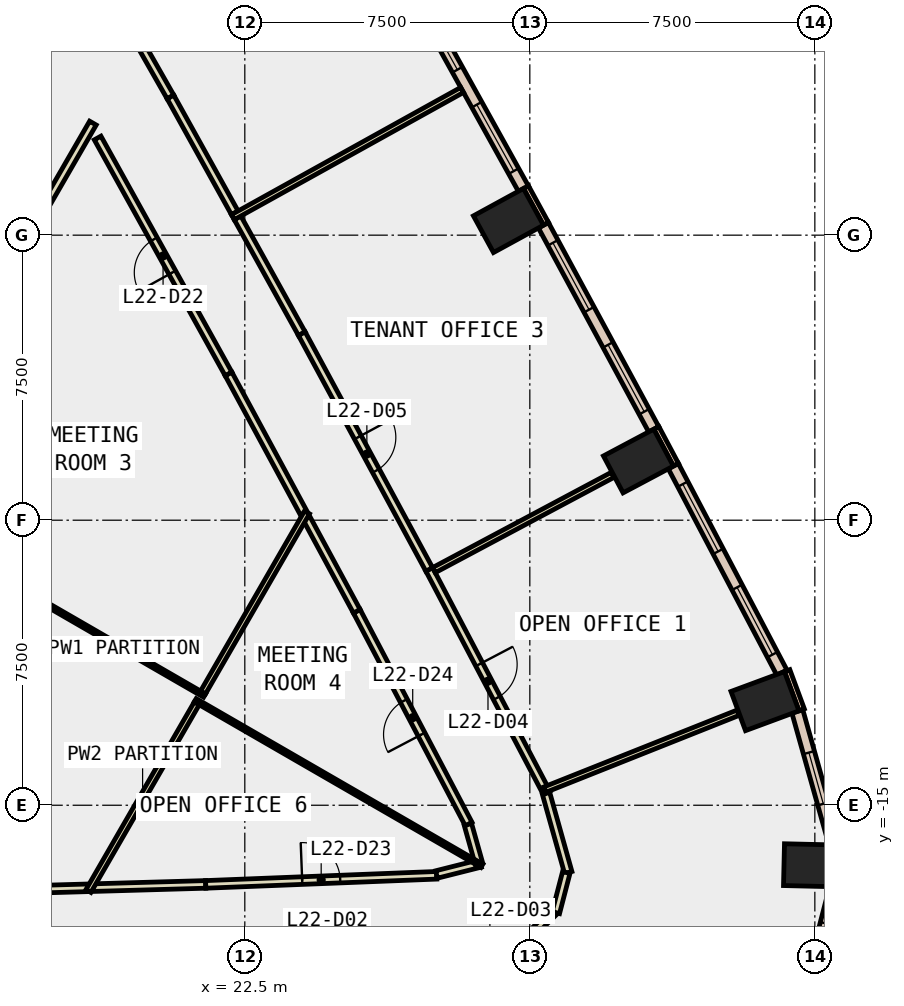
"""IFC4 building model, lengths in metres.
Left out: names, types, materials, properties, quantities, classifications, styles, units other than length and angle.
Written with IfcOpenShell. Run it as: python <this file> out.ifc"""

import sys

from ifc_helpers import new_model, si_unit, direction, frame, frame_2d, origin, origin_2d, place, context, subcontext, project, spatial, rectangle, extrude, element, fill, save


model = new_model("IFC4")
c1 = context("Model", 3, precision=1e-05, world=origin(), true_north=direction((0.0, 1.0)))
c2 = subcontext(c1, "Body", "Model", "MODEL_VIEW")
j1 = project(units=[si_unit("LENGTHUNIT", "METRE"), si_unit("PLANEANGLEUNIT", "RADIAN")], contexts=[c1])
p1 = place(None, origin())
s1 = spatial("IfcSite", under=j1, at=p1, CompositionType="ELEMENT")
p2 = place(p1, origin())
s2 = spatial("IfcBuilding", under=s1, at=p2, CompositionType="ELEMENT")
p3 = place(p2, frame((0.0, 0.0, 103.4)))
s3 = spatial("IfcBuildingStorey", under=s2, at=p3, CompositionType="ELEMENT", Elevation=103.4)
for number, where, z_axis, x_axis in (
    (1, (37.438, -16.581, -0.4), (0.0, 0.0, 1.0), (0.023, 1.0, 0.0)),
    (2, (36.188, -12.261, -0.4), (0.0, 0.0, 1.0), (-0.347, 0.938, 0.0)),
    (3, (32.858, -5.943, -0.4), (0.0, 0.0, 1.0), (-0.469, 0.883, 0.0)),
    (4, (29.438, 0.385, -0.4), (0.0, 0.0, 1.0), (-0.48, 0.877, 0.0)),
):
    element("IfcColumn", number, at=place(p3, frame(where, z_axis=z_axis, x_axis=x_axis)), inside=s3, PredefinedType="COLUMN", context=c2, shape_type="SweptSolid", body=[
        extrude(rectangle(XDim=1.1, YDim=1.5, at=origin_2d()), origin(), (0.0, 0.0, 1.0), 4.2),
    ])
p4 = place(p3, frame((37.153, -12.49, 0.0), z_axis=(0.0, 0.0, 1.0), x_axis=(-0.347205967468, 0.937788897436, 0.0)))
e5 = element("IfcWall", 5, at=p4, inside=s3, PredefinedType="STANDARD", context=c2, shape_type="SweptSolid", body=[
    extrude(rectangle(XDim=1.1, YDim=0.15, at=frame_2d((0.55, 0.0))), origin(), (0.0, 0.0, 1.0), 3.8),
])
p5 = place(p3, frame((33.845, -6.042, 0.0), z_axis=(0.0, 0.0, 1.0), x_axis=(-0.46919310775, 0.883095593716, 0.0)))
e6 = element("IfcWall", 6, at=p5, inside=s3, PredefinedType="STANDARD", context=c2, shape_type="SweptSolid", body=[
    extrude(rectangle(XDim=1.099, YDim=0.15, at=frame_2d((0.55, 0.0))), origin(), (0.0, 0.0, 1.0), 3.8),
])
p6 = place(p3, frame((30.426, 0.298, 0.0), z_axis=(0.0, 0.0, 1.0), x_axis=(-0.479737645119, 0.877411985247, 0.0)))
e7 = element("IfcWall", 7, at=p6, inside=s3, PredefinedType="STANDARD", context=c2, shape_type="SweptSolid", body=[
    extrude(rectangle(XDim=1.101, YDim=0.15, at=frame_2d((0.55, 0.0))), origin(), (0.0, 0.0, 1.0), 3.8),
])
p7 = place(p3, frame((37.189, -20.433, 0.0), z_axis=(0.0, 0.0, 1.0), x_axis=(0.251046938153, 0.967974914367, 0.0)))
e8 = element("IfcWall", 8, at=p7, inside=s3, PredefinedType="STANDARD", context=c2, shape_type="SweptSolid", body=[
    extrude(rectangle(XDim=3.398, YDim=0.3, at=frame_2d((1.699, 0.0))), origin(), (0.0, 0.0, 1.0), 3.8),
])
p8 = place(p7, frame((0.999, 0.0, 0.9)))
e9 = element("IfcOpeningElement", 9, at=p8, cuts=e8, PredefinedType="OPENING", context=c2, shape_type="SweptSolid", body=[
    extrude(rectangle(XDim=1.4, YDim=2.6, at=frame_2d((0.7, 1.3))), frame((0.0, 0.16, 0.0), z_axis=(0.0, -1.0, 0.0), x_axis=(1.0, 0.0, 0.0)), (0.0, 0.0, 1.0), 0.32),
])
p9 = place(p3, frame((38.026, -16.046, 0.0), z_axis=(0.0, 0.0, 1.0), x_axis=(-0.270054089595, 0.96284515302, 0.0)))
e10 = element("IfcWall", 10, at=p9, inside=s3, PredefinedType="STANDARD", context=c2, shape_type="SweptSolid", body=[
    extrude(rectangle(XDim=3.651, YDim=0.3, at=frame_2d((1.825, 0.0))), origin(), (0.0, 0.0, 1.0), 3.8),
])
p10 = place(p9, frame((1.125, 0.0, 0.9)))
e11 = element("IfcOpeningElement", 11, at=p10, cuts=e10, PredefinedType="OPENING", context=c2, shape_type="SweptSolid", body=[
    extrude(rectangle(XDim=1.4, YDim=2.6, at=frame_2d((0.7, 1.3))), frame((0.0, 0.16, 0.0), z_axis=(0.0, -1.0, 0.0), x_axis=(1.0, 0.0, 0.0)), (0.0, 0.0, 1.0), 0.32),
])
p11 = place(p3, frame((36.633, -11.511, 0.0), z_axis=(0.0, 0.0, 1.0), x_axis=(-0.465380908665, 0.88511050714, 0.0)))
e12 = element("IfcWall", 12, at=p11, inside=s3, PredefinedType="STANDARD", context=c2, shape_type="SweptSolid", body=[
    extrude(rectangle(XDim=6.139, YDim=0.3, at=frame_2d((3.07, 0.0))), origin(), (0.0, 0.0, 1.0), 3.8),
])
p12 = place(p11, frame((0.535, 0.0, 0.9)))
e13 = element("IfcOpeningElement", 13, at=p12, cuts=e12, PredefinedType="OPENING", context=c2, shape_type="SweptSolid", body=[
    extrude(rectangle(XDim=2.0, YDim=2.6, at=frame_2d((1.0, 1.3))), frame((0.0, 0.16, 0.0), z_axis=(0.0, -1.0, 0.0), x_axis=(1.0, 0.0, 0.0)), (0.0, 0.0, 1.0), 0.32),
])
p13 = place(p11, frame((3.604, 0.0, 0.9)))
e14 = element("IfcOpeningElement", 14, at=p13, cuts=e12, PredefinedType="OPENING", context=c2, shape_type="SweptSolid", body=[
    extrude(rectangle(XDim=2.0, YDim=2.6, at=frame_2d((1.0, 1.3))), frame((0.0, 0.16, 0.0), z_axis=(0.0, -1.0, 0.0), x_axis=(1.0, 0.0, 0.0)), (0.0, 0.0, 1.0), 0.32),
])
p14 = place(p3, frame((33.26, -5.108, 0.0), z_axis=(0.0, 0.0, 1.0), x_axis=(-0.475573079782, 0.879676216449, 0.0)))
e15 = element("IfcWall", 15, at=p14, inside=s3, PredefinedType="STANDARD", context=c2, shape_type="SweptSolid", body=[
    extrude(rectangle(XDim=6.104, YDim=0.3, at=frame_2d((3.052, 0.0))), origin(), (0.0, 0.0, 1.0), 3.8),
])
p15 = place(p14, frame((0.526, 0.0, 0.9)))
e16 = element("IfcOpeningElement", 16, at=p15, cuts=e15, PredefinedType="OPENING", context=c2, shape_type="SweptSolid", body=[
    extrude(rectangle(XDim=2.0, YDim=2.6, at=frame_2d((1.0, 1.3))), frame((0.0, 0.16, 0.0), z_axis=(0.0, -1.0, 0.0), x_axis=(1.0, 0.0, 0.0)), (0.0, 0.0, 1.0), 0.32),
])
p16 = place(p14, frame((3.578, 0.0, 0.9)))
e17 = element("IfcOpeningElement", 17, at=p16, cuts=e15, PredefinedType="OPENING", context=c2, shape_type="SweptSolid", body=[
    extrude(rectangle(XDim=2.0, YDim=2.6, at=frame_2d((1.0, 1.3))), frame((0.0, 0.16, 0.0), z_axis=(0.0, -1.0, 0.0), x_axis=(1.0, 0.0, 0.0)), (0.0, 0.0, 1.0), 0.32),
])
p17 = place(p3, frame((29.83, 1.225, 0.0), z_axis=(0.0, 0.0, 1.0), x_axis=(-0.485170774404, 0.874419418623, 0.0)))
e18 = element("IfcWall", 18, at=p17, inside=s3, PredefinedType="STANDARD", context=c2, shape_type="SweptSolid", body=[
    extrude(rectangle(XDim=6.103, YDim=0.3, at=frame_2d((3.052, 0.0))), origin(), (0.0, 0.0, 1.0), 3.8),
])
p18 = place(p17, frame((0.526, 0.0, 0.9)))
e19 = element("IfcOpeningElement", 19, at=p18, cuts=e18, PredefinedType="OPENING", context=c2, shape_type="SweptSolid", body=[
    extrude(rectangle(XDim=2.0, YDim=2.6, at=frame_2d((1.0, 1.3))), frame((0.0, 0.16, 0.0), z_axis=(0.0, -1.0, 0.0), x_axis=(1.0, 0.0, 0.0)), (0.0, 0.0, 1.0), 0.32),
])
p19 = place(p17, frame((3.578, 0.0, 0.9)))
e20 = element("IfcOpeningElement", 20, at=p19, cuts=e18, PredefinedType="OPENING", context=c2, shape_type="SweptSolid", body=[
    extrude(rectangle(XDim=2.0, YDim=2.6, at=frame_2d((1.0, 1.3))), frame((0.0, 0.16, 0.0), z_axis=(0.0, -1.0, 0.0), x_axis=(1.0, 0.0, 0.0)), (0.0, 0.0, 1.0), 0.32),
])
p20 = place(p3, frame((14.519, -17.283, 0.0), z_axis=(0.0, 0.0, 1.0), x_axis=(0.999591204998, 0.028590608419, 0.0)))
e21 = element("IfcWall", 21, at=p20, inside=s3, PredefinedType="PARTITIONING", context=c2, shape_type="SweptSolid", body=[
    extrude(rectangle(XDim=3.843, YDim=0.2, at=frame_2d((1.921, 0.0))), origin(), (0.0, 0.0, 1.0), 3.8),
])
p21 = place(p3, frame((24.051, -7.315, 0.0), z_axis=(0.0, 0.0, 1.0), x_axis=(-0.475308630647, 0.87981913234, 0.0)))
e22 = element("IfcWall", 22, at=p21, inside=s3, PredefinedType="PARTITIONING", context=c2, shape_type="SweptSolid", body=[
    extrude(rectangle(XDim=4.166, YDim=0.2, at=frame_2d((2.083, 0.0))), origin(), (0.0, 0.0, 1.0), 3.8),
])
p22 = place(p3, frame((22.071, -3.65, 0.0), z_axis=(0.0, 0.0, 1.0), x_axis=(-0.485198988697, 0.874403763354, 0.0)))
e23 = element("IfcWall", 23, at=p22, inside=s3, PredefinedType="PARTITIONING", context=c2, shape_type="SweptSolid", body=[
    extrude(rectangle(XDim=7.098, YDim=0.2, at=frame_2d((3.549, 0.0))), origin(), (0.0, 0.0, 1.0), 3.8),
])
p23 = place(p22, frame((3.049, 0.0, 0.0)))
e24 = element("IfcOpeningElement", 24, at=p23, cuts=e23, PredefinedType="OPENING", context=c2, shape_type="SweptSolid", body=[
    extrude(rectangle(XDim=1.0, YDim=2.1, at=frame_2d((0.5, 1.05))), frame((0.0, 0.11, 0.0), z_axis=(0.0, -1.0, 0.0), x_axis=(1.0, 0.0, 0.0)), (0.0, 0.0, 1.0), 0.22),
])
p24 = place(p3, frame((18.509, -17.168, 0.0), z_axis=(0.0, 0.0, 1.0), x_axis=(0.999588854267, 0.028672677323, 0.0)))
e25 = element("IfcWall", 25, at=p24, inside=s3, PredefinedType="PARTITIONING", context=c2, shape_type="SweptSolid", body=[
    extrude(rectangle(XDim=2.963, YDim=0.2, at=frame_2d((1.481, 0.0))), origin(), (0.0, 0.0, 1.0), 3.8),
])
p25 = place(p3, frame((21.471, -17.083, 0.0), z_axis=(0.0, 0.0, 1.0), x_axis=(0.999221407079, 0.039453512338, 0.0)))
e26 = element("IfcWall", 26, at=p25, inside=s3, PredefinedType="PARTITIONING", context=c2, shape_type="SweptSolid", body=[
    extrude(rectangle(XDim=6.083, YDim=0.2, at=frame_2d((3.042, 0.0))), origin(), (0.0, 0.0, 1.0), 3.8),
])
p26 = place(p25, frame((2.541, 0.0, 0.0)))
e27 = element("IfcOpeningElement", 27, at=p26, cuts=e26, PredefinedType="OPENING", context=c2, shape_type="SweptSolid", body=[
    extrude(rectangle(XDim=1.0, YDim=2.1, at=frame_2d((0.5, 1.05))), frame((0.0, 0.11, 0.0), z_axis=(0.0, -1.0, 0.0), x_axis=(1.0, 0.0, 0.0)), (0.0, 0.0, 1.0), 0.22),
])
p27 = place(p3, frame((27.546, -16.822, 0.0), z_axis=(0.0, 0.0, 1.0), x_axis=(0.969694756333, 0.244319625777, 0.0)))
e28 = element("IfcWall", 28, at=p27, inside=s3, PredefinedType="PARTITIONING", context=c2, shape_type="SweptSolid", body=[
    extrude(rectangle(XDim=1.191, YDim=0.2, at=frame_2d((0.596, 0.0))), origin(), (0.0, 0.0, 1.0), 3.8),
])
p28 = place(p3, frame((28.662, -16.541, 0.0), z_axis=(0.0, 0.0, 1.0), x_axis=(-0.270771802087, 0.96264356394, 0.0)))
e29 = element("IfcWall", 29, at=p28, inside=s3, PredefinedType="PARTITIONING", context=c2, shape_type="SweptSolid", body=[
    extrude(rectangle(XDim=1.078, YDim=0.2, at=frame_2d((0.539, 0.0))), origin(), (0.0, 0.0, 1.0), 3.8),
])
p29 = place(p3, frame((28.39, -15.495, 0.0), z_axis=(0.0, 0.0, 1.0), x_axis=(-0.465367816287, 0.885117390838, 0.0)))
e30 = element("IfcWall", 30, at=p29, inside=s3, PredefinedType="PARTITIONING", context=c2, shape_type="SweptSolid", body=[
    extrude(rectangle(XDim=6.326, YDim=0.2, at=frame_2d((3.163, 0.0))), origin(), (0.0, 0.0, 1.0), 3.8),
])
p30 = place(p29, frame((2.663, 0.0, 0.0)))
e31 = element("IfcOpeningElement", 31, at=p30, cuts=e30, PredefinedType="OPENING", context=c2, shape_type="SweptSolid", body=[
    extrude(rectangle(XDim=1.0, YDim=2.1, at=frame_2d((0.5, 1.05))), frame((0.0, 0.11, 0.0), z_axis=(0.0, -1.0, 0.0), x_axis=(1.0, 0.0, 0.0)), (0.0, 0.0, 1.0), 0.22),
])
p31 = place(p3, frame((25.446, -9.896, 0.0), z_axis=(0.0, 0.0, 1.0), x_axis=(-0.475427182652, 0.879755076141, 0.0)))
e32 = element("IfcWall", 32, at=p31, inside=s3, PredefinedType="PARTITIONING", context=c2, shape_type="SweptSolid", body=[
    extrude(rectangle(XDim=2.785, YDim=0.2, at=frame_2d((1.393, 0.0))), origin(), (0.0, 0.0, 1.0), 3.8),
])
p32 = place(p3, frame((30.426, -14.685, 0.0), z_axis=(0.0, 0.0, 1.0), x_axis=(0.270131711391, -0.962823378664, 0.0)))
e33 = element("IfcWall", 33, at=p32, inside=s3, PredefinedType="PARTITIONING", context=c2, shape_type="SweptSolid", body=[
    extrude(rectangle(XDim=2.166, YDim=0.2, at=frame_2d((1.083, 0.0))), origin(), (0.0, 0.0, 1.0), 3.8),
])
p33 = place(p3, frame((30.959, -16.771, 0.0), z_axis=(0.0, 0.0, 1.0), x_axis=(-0.251109729392, -0.967958627114, 0.0)))
e34 = element("IfcWall", 34, at=p33, inside=s3, PredefinedType="PARTITIONING", context=c2, shape_type="SweptSolid", body=[
    extrude(rectangle(XDim=1.091, YDim=0.2, at=frame_2d((0.545, 0.0))), origin(), (0.0, 0.0, 1.0), 3.8),
])
p34 = place(p3, frame((30.639, -17.801, 0.0), z_axis=(0.0, 0.0, 1.0), x_axis=(-0.713329122722, -0.700829196507, 0.0)))
e35 = element("IfcWall", 35, at=p34, inside=s3, PredefinedType="PARTITIONING", context=c2, shape_type="SweptSolid", body=[
    extrude(rectangle(XDim=0.879, YDim=0.2, at=frame_2d((0.439, 0.0))), origin(), (0.0, 0.0, 1.0), 3.8),
])
p35 = place(p3, frame((27.353, -8.794, 0.0), z_axis=(0.0, 0.0, 1.0), x_axis=(0.465239168813, -0.885185017836, 0.0)))
e36 = element("IfcWall", 36, at=p35, inside=s3, PredefinedType="PARTITIONING", context=c2, shape_type="SweptSolid", body=[
    extrude(rectangle(XDim=6.646, YDim=0.2, at=frame_2d((3.323, 0.0))), origin(), (0.0, 0.0, 1.0), 3.8),
])
p36 = place(p35, frame((2.823, 0.0, 0.0)))
e37 = element("IfcOpeningElement", 37, at=p36, cuts=e36, PredefinedType="OPENING", context=c2, shape_type="SweptSolid", body=[
    extrude(rectangle(XDim=1.0, YDim=2.1, at=frame_2d((0.5, 1.05))), frame((0.0, 0.11, 0.0), z_axis=(0.0, -1.0, 0.0), x_axis=(1.0, 0.0, 0.0)), (0.0, 0.0, 1.0), 0.22),
])
p37 = place(p3, frame((22.309, 0.456, 0.0), z_axis=(0.0, 0.0, 1.0), x_axis=(0.484982854201, -0.87452365956, 0.0)))
e38 = element("IfcWall", 38, at=p37, inside=s3, PredefinedType="PARTITIONING", context=c2, shape_type="SweptSolid", body=[
    extrude(rectangle(XDim=3.487, YDim=0.2, at=frame_2d((1.743, 0.0))), origin(), (0.0, 0.0, 1.0), 3.8),
])
p38 = place(p3, frame((24.0, -2.593, 0.0), z_axis=(0.0, 0.0, 1.0), x_axis=(0.475480817472, -0.879726089312, 0.0)))
e39 = element("IfcWall", 39, at=p38, inside=s3, PredefinedType="PARTITIONING", context=c2, shape_type="SweptSolid", body=[
    extrude(rectangle(XDim=7.05, YDim=0.2, at=frame_2d((3.525, 0.0))), origin(), (0.0, 0.0, 1.0), 3.8),
])
p39 = place(p38, frame((3.1, 0.0, 0.0)))
e40 = element("IfcOpeningElement", 40, at=p39, cuts=e39, PredefinedType="OPENING", context=c2, shape_type="SweptSolid", body=[
    extrude(rectangle(XDim=1.0, YDim=2.1, at=frame_2d((0.5, 1.05))), frame((0.0, 0.11, 0.0), z_axis=(0.0, -1.0, 0.0), x_axis=(1.0, 0.0, 0.0)), (0.0, 0.0, 1.0), 0.22),
])
p40 = place(p3, frame((16.98, 9.89, 0.0), z_axis=(0.0, 0.0, 1.0), x_axis=(0.495123170501, -0.868822793228, 0.0)))
e41 = element("IfcWall", 41, at=p40, inside=s3, PredefinedType="PARTITIONING", context=c2, shape_type="SweptSolid", body=[
    extrude(rectangle(XDim=7.198, YDim=0.2, at=frame_2d((3.599, 0.0))), origin(), (0.0, 0.0, 1.0), 3.8),
])
p41 = place(p40, frame((3.099, 0.0, 0.0)))
e42 = element("IfcOpeningElement", 42, at=p41, cuts=e41, PredefinedType="OPENING", context=c2, shape_type="SweptSolid", body=[
    extrude(rectangle(XDim=1.0, YDim=2.1, at=frame_2d((0.5, 1.05))), frame((0.0, 0.11, 0.0), z_axis=(0.0, -1.0, 0.0), x_axis=(1.0, 0.0, 0.0)), (0.0, 0.0, 1.0), 0.22),
])
p42 = place(p3, frame((20.544, 3.636, 0.0), z_axis=(0.0, 0.0, 1.0), x_axis=(0.485250552989, -0.874375148792, 0.0)))
e43 = element("IfcWall", 43, at=p42, inside=s3, PredefinedType="PARTITIONING", context=c2, shape_type="SweptSolid", body=[
    extrude(rectangle(XDim=3.487, YDim=0.2, at=frame_2d((1.744, 0.0))), origin(), (0.0, 0.0, 1.0), 3.8),
])
p43 = place(p3, frame((18.503, 2.949, 0.0), z_axis=(0.0, 0.0, 1.0), x_axis=(-0.49997390151, -0.86604047123, 0.0)))
e44 = element("IfcWall", 44, at=p43, inside=s3, PredefinedType="PARTITIONING", context=c2, shape_type="SweptSolid", body=[
    extrude(rectangle(XDim=11.626, YDim=0.2, at=frame_2d((5.813, 0.0))), origin(), (0.0, 0.0, 1.0), 3.8),
])
p44 = place(p3, frame((17.219, -9.676, 0.0), z_axis=(0.0, 0.0, 1.0), x_axis=(0.86598459596, -0.500070674565, 0.0)))
e45 = element("IfcWall", 45, at=p44, inside=s3, PredefinedType="PARTITIONING", context=c2, shape_type="SweptSolid", body=[
    extrude(rectangle(XDim=4.875, YDim=0.1, at=frame_2d((2.438, 0.0))), origin(), (0.0, 0.0, 1.0), 3.8),
])
p45 = place(p3, frame((21.236, -12.319, 0.0), z_axis=(0.0, 0.0, 1.0), x_axis=(-0.500016488359, -0.866015884017, 0.0)))
e46 = element("IfcWall", 46, at=p45, inside=s3, PredefinedType="PARTITIONING", context=c2, shape_type="SweptSolid", body=[
    extrude(rectangle(XDim=5.702, YDim=0.15, at=frame_2d((2.851, 0.0))), origin(), (0.0, 0.0, 1.0), 3.8),
])
p46 = place(p3, frame((24.137, -7.294, 0.0), z_axis=(0.0, 0.0, 1.0), x_axis=(-0.500001804394, -0.866024362014, 0.0)))
e47 = element("IfcWall", 47, at=p46, inside=s3, PredefinedType="PARTITIONING", context=c2, shape_type="SweptSolid", body=[
    extrude(rectangle(XDim=5.472, YDim=0.15, at=frame_2d((2.736, 0.0))), origin(), (0.0, 0.0, 1.0), 3.8),
])
p47 = place(p3, frame((21.196, -12.238, 0.0), z_axis=(0.0, 0.0, 1.0), x_axis=(0.866023145199, -0.500003911965, 0.0)))
e48 = element("IfcWall", 48, at=p47, inside=s3, PredefinedType="PARTITIONING", context=c2, shape_type="SweptSolid", body=[
    extrude(rectangle(XDim=8.71, YDim=0.1, at=frame_2d((4.355, 0.0))), origin(), (0.0, 0.0, 1.0), 3.8),
])
p48 = place(p3, frame((30.399, -14.588, 0.0), z_axis=(0.0, 0.0, 1.0), x_axis=(0.92913411584, 0.36974287658, 0.0)))
e49 = element("IfcWall", 49, at=p48, inside=s3, PredefinedType="PARTITIONING", context=c2, shape_type="SweptSolid", body=[
    extrude(rectangle(XDim=5.469, YDim=0.15, at=frame_2d((2.734, 0.0))), origin(), (0.0, 0.0, 1.0), 3.8),
])
p49 = place(p3, frame((27.476, -8.814, 0.0), z_axis=(0.0, 0.0, 1.0), x_axis=(0.882440424847, 0.47042416668, 0.0)))
e50 = element("IfcWall", 50, at=p49, inside=s3, PredefinedType="PARTITIONING", context=c2, shape_type="SweptSolid", body=[
    extrude(rectangle(XDim=5.329, YDim=0.15, at=frame_2d((2.665, 0.0))), origin(), (0.0, 0.0, 1.0), 3.8),
])
p50 = place(p3, frame((22.185, 0.473, 0.0), z_axis=(0.0, 0.0, 1.0), x_axis=(0.874372498137, 0.485255329184, 0.0)))
e51 = element("IfcWall", 51, at=p50, inside=s3, PredefinedType="PARTITIONING", context=c2, shape_type="SweptSolid", body=[
    extrude(rectangle(XDim=6.9, YDim=0.15, at=frame_2d((3.45, 0.0))), origin(), (0.0, 0.0, 1.0), 3.8),
])
p51 = place(p8, origin())
e52 = element("IfcWindow", 52, at=p51, inside=s3, PartitioningType="SINGLE_PANEL", PredefinedType="WINDOW", context=c2, shape_type="SweptSolid", body=[
    extrude(rectangle(XDim=1.4, YDim=2.6, at=frame_2d((0.7, 1.3))), frame((0.0, 0.03, 0.0), z_axis=(0.0, -1.0, 0.0), x_axis=(1.0, 0.0, 0.0)), (0.0, 0.0, 1.0), 0.06),
])
fill(e9, e52)
p52 = place(p10, origin())
e53 = element("IfcWindow", 53, at=p52, inside=s3, PartitioningType="SINGLE_PANEL", PredefinedType="WINDOW", context=c2, shape_type="SweptSolid", body=[
    extrude(rectangle(XDim=1.4, YDim=2.6, at=frame_2d((0.7, 1.3))), frame((0.0, 0.03, 0.0), z_axis=(0.0, -1.0, 0.0), x_axis=(1.0, 0.0, 0.0)), (0.0, 0.0, 1.0), 0.06),
])
fill(e11, e53)
p53 = place(p12, origin())
e54 = element("IfcWindow", 54, at=p53, inside=s3, PartitioningType="SINGLE_PANEL", PredefinedType="WINDOW", context=c2, shape_type="SweptSolid", body=[
    extrude(rectangle(XDim=2.0, YDim=2.6, at=frame_2d((1.0, 1.3))), frame((0.0, 0.03, 0.0), z_axis=(0.0, -1.0, 0.0), x_axis=(1.0, 0.0, 0.0)), (0.0, 0.0, 1.0), 0.06),
])
fill(e13, e54)
p54 = place(p13, origin())
e55 = element("IfcWindow", 55, at=p54, inside=s3, PartitioningType="SINGLE_PANEL", PredefinedType="WINDOW", context=c2, shape_type="SweptSolid", body=[
    extrude(rectangle(XDim=2.0, YDim=2.6, at=frame_2d((1.0, 1.3))), frame((0.0, 0.03, 0.0), z_axis=(0.0, -1.0, 0.0), x_axis=(1.0, 0.0, 0.0)), (0.0, 0.0, 1.0), 0.06),
])
fill(e14, e55)
p55 = place(p15, origin())
e56 = element("IfcWindow", 56, at=p55, inside=s3, PartitioningType="SINGLE_PANEL", PredefinedType="WINDOW", context=c2, shape_type="SweptSolid", body=[
    extrude(rectangle(XDim=2.0, YDim=2.6, at=frame_2d((1.0, 1.3))), frame((0.0, 0.03, 0.0), z_axis=(0.0, -1.0, 0.0), x_axis=(1.0, 0.0, 0.0)), (0.0, 0.0, 1.0), 0.06),
])
fill(e16, e56)
p56 = place(p16, origin())
e57 = element("IfcWindow", 57, at=p56, inside=s3, PartitioningType="SINGLE_PANEL", PredefinedType="WINDOW", context=c2, shape_type="SweptSolid", body=[
    extrude(rectangle(XDim=2.0, YDim=2.6, at=frame_2d((1.0, 1.3))), frame((0.0, 0.03, 0.0), z_axis=(0.0, -1.0, 0.0), x_axis=(1.0, 0.0, 0.0)), (0.0, 0.0, 1.0), 0.06),
])
fill(e17, e57)
p57 = place(p18, origin())
e58 = element("IfcWindow", 58, at=p57, inside=s3, PartitioningType="SINGLE_PANEL", PredefinedType="WINDOW", context=c2, shape_type="SweptSolid", body=[
    extrude(rectangle(XDim=2.0, YDim=2.6, at=frame_2d((1.0, 1.3))), frame((0.0, 0.03, 0.0), z_axis=(0.0, -1.0, 0.0), x_axis=(1.0, 0.0, 0.0)), (0.0, 0.0, 1.0), 0.06),
])
fill(e19, e58)
p58 = place(p19, origin())
e59 = element("IfcWindow", 59, at=p58, inside=s3, PartitioningType="SINGLE_PANEL", PredefinedType="WINDOW", context=c2, shape_type="SweptSolid", body=[
    extrude(rectangle(XDim=2.0, YDim=2.6, at=frame_2d((1.0, 1.3))), frame((0.0, 0.03, 0.0), z_axis=(0.0, -1.0, 0.0), x_axis=(1.0, 0.0, 0.0)), (0.0, 0.0, 1.0), 0.06),
])
fill(e20, e59)
p59 = place(p36, origin())
e60 = element("IfcDoor", 60, at=p59, inside=s3, OperationType="SINGLE_SWING_LEFT", PredefinedType="DOOR", context=c2, shape_type="SweptSolid", body=[
    extrude(rectangle(XDim=1.0, YDim=2.1, at=frame_2d((0.5, 1.05))), frame((0.0, 0.025, 0.0), z_axis=(0.0, -1.0, 0.0), x_axis=(1.0, 0.0, 0.0)), (0.0, 0.0, 1.0), 0.05),
])
fill(e37, e60)
p60 = place(p39, origin())
e61 = element("IfcDoor", 61, at=p60, inside=s3, OperationType="SINGLE_SWING_LEFT", PredefinedType="DOOR", context=c2, shape_type="SweptSolid", body=[
    extrude(rectangle(XDim=1.0, YDim=2.1, at=frame_2d((0.5, 1.05))), frame((0.0, 0.025, 0.0), z_axis=(0.0, -1.0, 0.0), x_axis=(1.0, 0.0, 0.0)), (0.0, 0.0, 1.0), 0.05),
])
fill(e40, e61)
p61 = place(p23, origin())
e62 = element("IfcDoor", 62, at=p61, inside=s3, OperationType="SINGLE_SWING_RIGHT", PredefinedType="DOOR", context=c2, shape_type="SweptSolid", body=[
    extrude(rectangle(XDim=1.0, YDim=2.1, at=frame_2d((0.5, 1.05))), frame((0.0, 0.025, 0.0), z_axis=(0.0, -1.0, 0.0), x_axis=(1.0, 0.0, 0.0)), (0.0, 0.0, 1.0), 0.05),
])
fill(e24, e62)
p62 = place(p26, origin())
e63 = element("IfcDoor", 63, at=p62, inside=s3, OperationType="SINGLE_SWING_LEFT", PredefinedType="DOOR", context=c2, shape_type="SweptSolid", body=[
    extrude(rectangle(XDim=1.0, YDim=2.1, at=frame_2d((0.5, 1.05))), frame((0.0, 0.025, 0.0), z_axis=(0.0, -1.0, 0.0), x_axis=(1.0, 0.0, 0.0)), (0.0, 0.0, 1.0), 0.05),
])
fill(e27, e63)
p63 = place(p30, origin())
e64 = element("IfcDoor", 64, at=p63, inside=s3, OperationType="SINGLE_SWING_LEFT", PredefinedType="DOOR", context=c2, shape_type="SweptSolid", body=[
    extrude(rectangle(XDim=1.0, YDim=2.1, at=frame_2d((0.5, 1.05))), frame((0.0, 0.025, 0.0), z_axis=(0.0, -1.0, 0.0), x_axis=(1.0, 0.0, 0.0)), (0.0, 0.0, 1.0), 0.05),
])
fill(e31, e64)
save(model, sys.argv[1])
